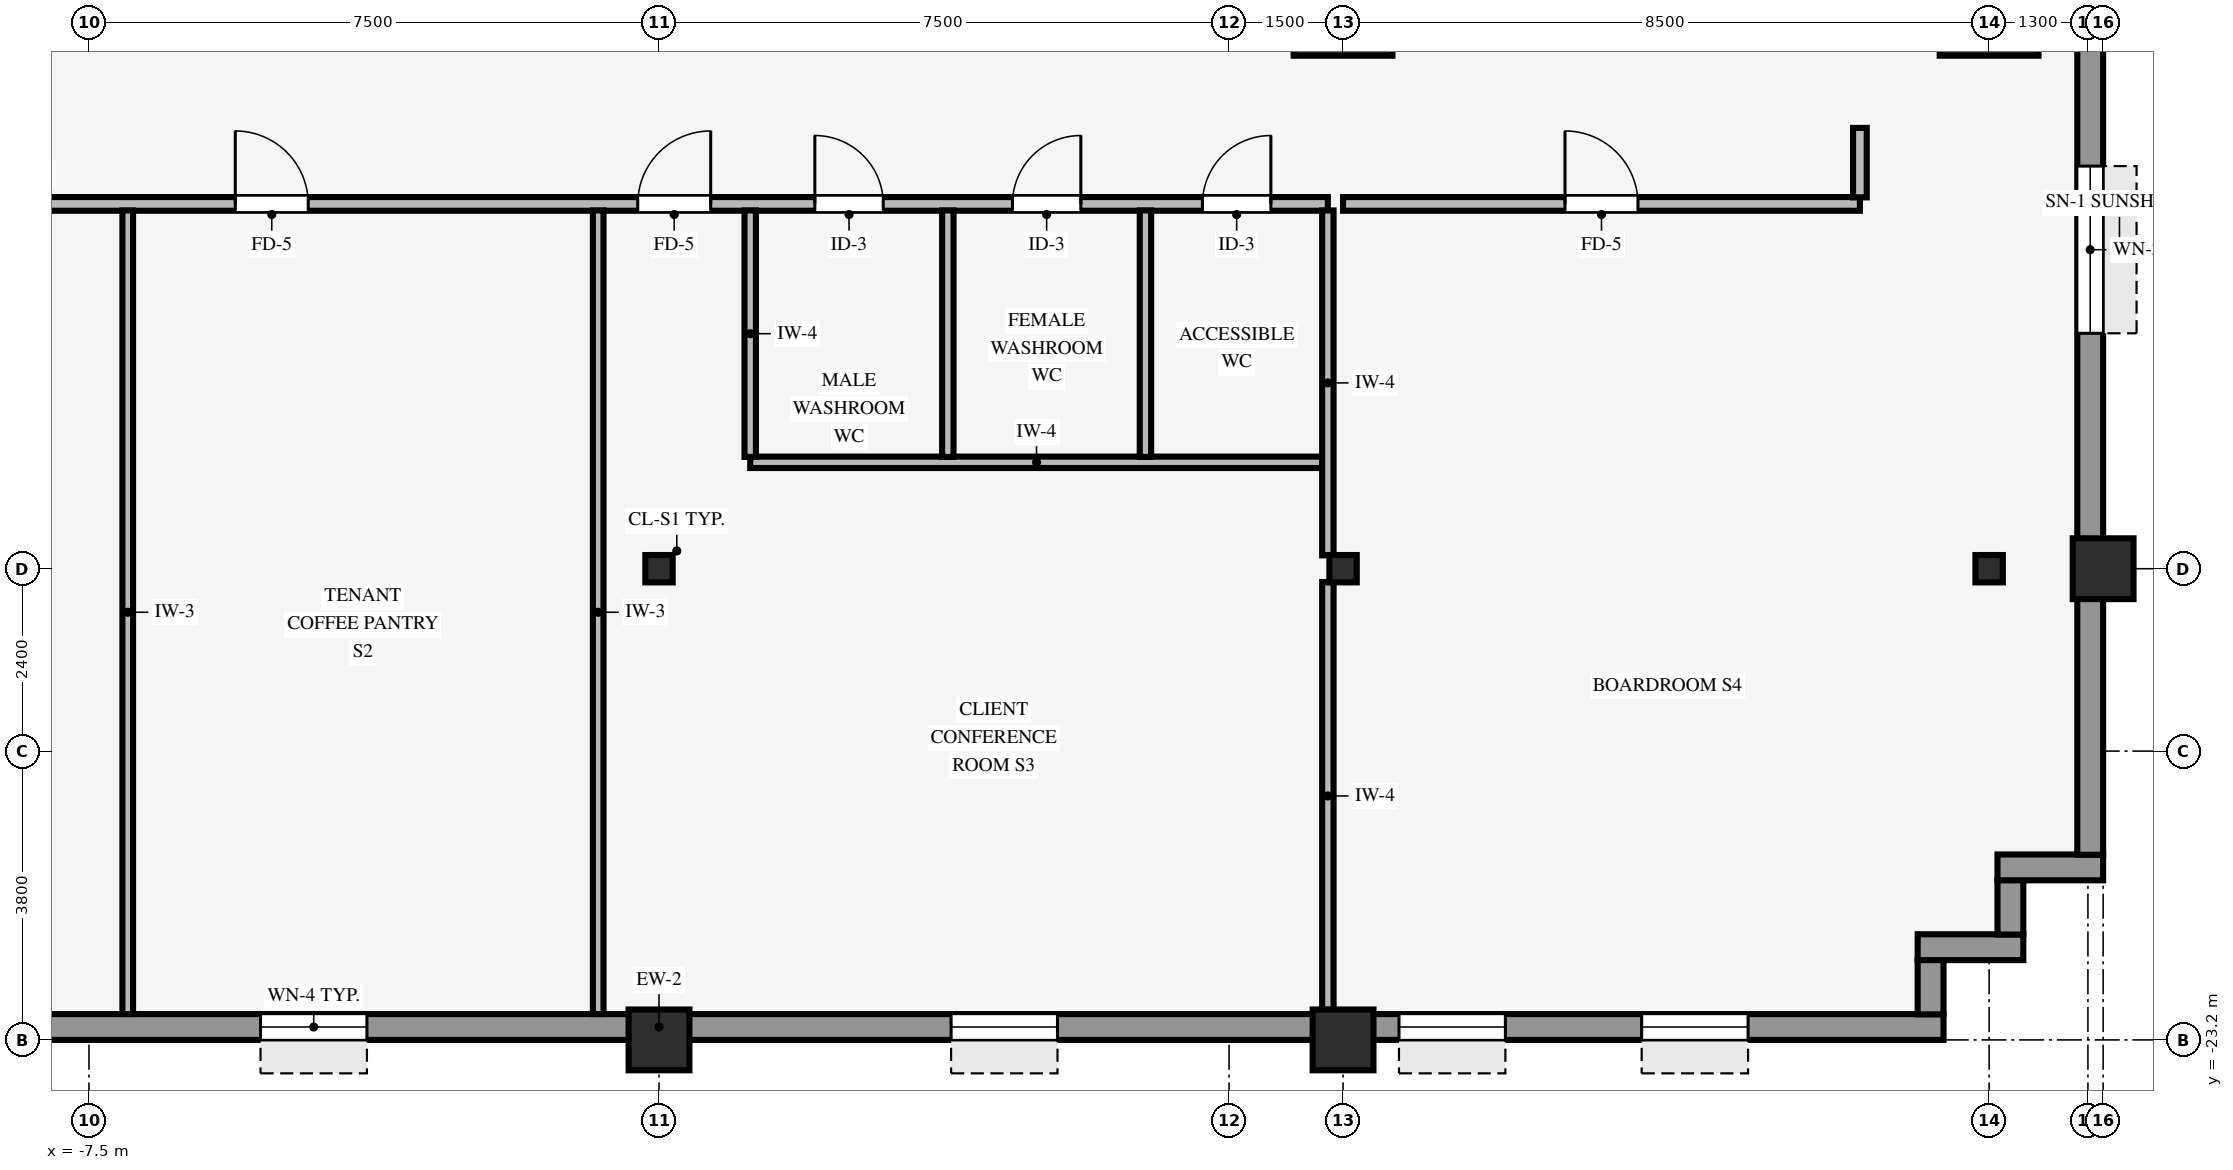
"""IFC4 building model, lengths in metres.
Left out: names, types, materials, properties, quantities, classifications, styles, units other than length and angle.
Written with IfcOpenShell. Run it as: python <this file> out.ifc"""

import sys

from ifc_helpers import new_model, si_unit, direction, frame, frame_2d, origin, origin_2d, place, context, subcontext, project, spatial, rectangle, hollow_rectangle, i_section, extrude, source, transform, mapped, element, fill, save


model = new_model("IFC4")
c1 = context("Model", 3, precision=1e-05, world=origin(), true_north=direction((0.0, 1.0)))
c2 = subcontext(c1, "Body", "Model", "MODEL_VIEW")
j1 = project(units=[si_unit("LENGTHUNIT", "METRE"), si_unit("PLANEANGLEUNIT", "RADIAN")], contexts=[c1])
p1 = place(None, origin())
s1 = spatial("IfcSite", under=j1, at=p1, CompositionType="ELEMENT")
p2 = place(p1, origin())
s2 = spatial("IfcBuilding", under=s1, at=p2, CompositionType="ELEMENT")
p3 = place(p2, frame((0.0, 0.0, 31.25)))
s3 = spatial("IfcBuildingStorey", under=s2, at=p3, CompositionType="ELEMENT", Elevation=31.25)
for number, where, z_axis, x_axis in (
    (1, (9.0, -9.6, 0.0), (0.0, 0.0, 1.0), (1.0, 0.0, 0.0)),
    (2, (17.5, -9.6, 0.0), (0.0, 0.0, 1.0), (1.0, 0.0, 0.0)),
):
    element("IfcColumn", number, at=place(p3, frame(where, z_axis=z_axis, x_axis=x_axis)), inside=s3, PredefinedType="COLUMN", context=c2, shape_type="SweptSolid", body=[
        extrude(rectangle(XDim=1.3, YDim=1.3, at=origin_2d()), origin(), (0.0, 0.0, 1.0), 3.37),
    ])
for number, where, z_axis, x_axis in (
    (3, (19.0, -17.0, 0.0), (0.0, 0.0, 1.0), (1.0, 0.0, 0.0)),
    (4, (0.0, -23.2, 0.0), (0.0, 0.0, 1.0), (1.0, 0.0, 0.0)),
    (5, (9.0, -23.2, 0.0), (0.0, 0.0, 1.0), (1.0, 0.0, 0.0)),
):
    element("IfcColumn", number, at=place(p3, frame(where, z_axis=z_axis, x_axis=x_axis)), inside=s3, PredefinedType="COLUMN", context=c2, shape_type="SweptSolid", body=[
        extrude(hollow_rectangle(XDim=0.8, YDim=0.8, WallThickness=0.055, InnerFilletRadius=0.055, OuterFilletRadius=0.11, at=origin_2d()), origin(), (0.0, 0.0, 1.0), 3.37),
    ])
for number, where, z_axis, x_axis in (
    (6, (0.0, -17.0, 0.0), (0.0, 0.0, 1.0), (1.0, 0.0, 0.0)),
    (7, (9.0, -17.0, 0.0), (0.0, 0.0, 1.0), (1.0, 0.0, 0.0)),
    (8, (17.5, -17.0, 0.0), (0.0, 0.0, 1.0), (1.0, 0.0, 0.0)),
):
    element("IfcColumn", number, at=place(p3, frame(where, z_axis=z_axis, x_axis=x_axis)), inside=s3, PredefinedType="COLUMN", context=c2, shape_type="SweptSolid", body=[
        extrude(i_section(OverallWidth=0.36, OverallDepth=0.36, WebThickness=0.021, FlangeThickness=0.021, FilletRadius=0.018, at=origin_2d()), origin(), (0.0, 0.0, 1.0), 3.37),
    ])
p4 = place(p3, frame((-16.9, -23.03, 0.0), z_axis=(0.0, 0.0, 1.0), x_axis=(1.0, 0.0, 0.0)))
e9 = element("IfcWall", 9, at=p4, inside=s3, PredefinedType="STANDARD", context=c2, shape_type="SweptSolid", body=[
    extrude(rectangle(XDim=33.8, YDim=0.34, at=frame_2d((16.9, 0.0))), origin(), (0.0, 0.0, 1.0), 2.705),
])
p5 = place(p4, frame((2.571, 0.0, 0.8)))
e10 = element("IfcOpeningElement", 10, at=p5, cuts=e9, PredefinedType="OPENING", context=c2, shape_type="SweptSolid", body=[
    extrude(rectangle(XDim=1.4, YDim=1.65, at=frame_2d((0.7, 0.825))), frame((0.0, 0.18, 0.0), z_axis=(0.0, -1.0, 0.0), x_axis=(1.0, 0.0, 0.0)), (0.0, 0.0, 1.0), 0.36),
])
p6 = place(p4, frame((5.764, 0.0, 0.8)))
e11 = element("IfcOpeningElement", 11, at=p6, cuts=e9, PredefinedType="OPENING", context=c2, shape_type="SweptSolid", body=[
    extrude(rectangle(XDim=1.4, YDim=1.65, at=frame_2d((0.7, 0.825))), frame((0.0, 0.18, 0.0), z_axis=(0.0, -1.0, 0.0), x_axis=(1.0, 0.0, 0.0)), (0.0, 0.0, 1.0), 0.36),
])
p7 = place(p4, frame((11.657, 0.0, 0.8)))
e12 = element("IfcOpeningElement", 12, at=p7, cuts=e9, PredefinedType="OPENING", context=c2, shape_type="SweptSolid", body=[
    extrude(rectangle(XDim=1.4, YDim=1.65, at=frame_2d((0.7, 0.825))), frame((0.0, 0.18, 0.0), z_axis=(0.0, -1.0, 0.0), x_axis=(1.0, 0.0, 0.0)), (0.0, 0.0, 1.0), 0.36),
])
p8 = place(p4, frame((20.743, 0.0, 0.8)))
e13 = element("IfcOpeningElement", 13, at=p8, cuts=e9, PredefinedType="OPENING", context=c2, shape_type="SweptSolid", body=[
    extrude(rectangle(XDim=1.4, YDim=1.65, at=frame_2d((0.7, 0.825))), frame((0.0, 0.18, 0.0), z_axis=(0.0, -1.0, 0.0), x_axis=(1.0, 0.0, 0.0)), (0.0, 0.0, 1.0), 0.36),
])
p9 = place(p4, frame((26.636, 0.0, 0.8)))
e14 = element("IfcOpeningElement", 14, at=p9, cuts=e9, PredefinedType="OPENING", context=c2, shape_type="SweptSolid", body=[
    extrude(rectangle(XDim=1.4, YDim=1.65, at=frame_2d((0.7, 0.825))), frame((0.0, 0.18, 0.0), z_axis=(0.0, -1.0, 0.0), x_axis=(1.0, 0.0, 0.0)), (0.0, 0.0, 1.0), 0.36),
])
p10 = place(p4, frame((29.829, 0.0, 0.8)))
e15 = element("IfcOpeningElement", 15, at=p10, cuts=e9, PredefinedType="OPENING", context=c2, shape_type="SweptSolid", body=[
    extrude(rectangle(XDim=1.4, YDim=1.65, at=frame_2d((0.7, 0.825))), frame((0.0, 0.18, 0.0), z_axis=(0.0, -1.0, 0.0), x_axis=(1.0, 0.0, 0.0)), (0.0, 0.0, 1.0), 0.36),
])
p11 = place(p3, frame((16.73, -22.864, 0.0), z_axis=(0.0, 0.0, 1.0), x_axis=(0.0, 1.0, 0.0)))
e16 = element("IfcWall", 16, at=p11, inside=s3, PredefinedType="STANDARD", context=c2, shape_type="SweptSolid", body=[
    extrude(rectangle(XDim=0.718, YDim=0.34, at=frame_2d((0.359, 0.0))), origin(), (0.0, 0.0, 1.0), 3.36),
])
p12 = place(p3, frame((16.56, -21.98, 0.0), z_axis=(0.0, 0.0, 1.0), x_axis=(1.0, 0.0, 0.0)))
e17 = element("IfcWall", 17, at=p12, inside=s3, PredefinedType="STANDARD", context=c2, shape_type="SweptSolid", body=[
    extrude(rectangle(XDim=1.39, YDim=0.34, at=frame_2d((0.695, 0.0))), origin(), (0.0, 0.0, 1.0), 3.36),
])
p13 = place(p3, frame((17.78, -21.814, 0.0), z_axis=(0.0, 0.0, 1.0), x_axis=(0.0, 1.0, 0.0)))
e18 = element("IfcWall", 18, at=p13, inside=s3, PredefinedType="STANDARD", context=c2, shape_type="SweptSolid", body=[
    extrude(rectangle(XDim=0.718, YDim=0.34, at=frame_2d((0.359, 0.0))), origin(), (0.0, 0.0, 1.0), 3.36),
])
p14 = place(p3, frame((17.61, -20.93, 0.0), z_axis=(0.0, 0.0, 1.0), x_axis=(1.0, 0.0, 0.0)))
e19 = element("IfcWall", 19, at=p14, inside=s3, PredefinedType="STANDARD", context=c2, shape_type="SweptSolid", body=[
    extrude(rectangle(XDim=1.39, YDim=0.34, at=frame_2d((0.695, 0.0))), origin(), (0.0, 0.0, 1.0), 3.36),
])
p15 = place(p3, frame((18.83, -20.764, 0.0), z_axis=(0.0, 0.0, 1.0), x_axis=(0.0, 1.0, 0.0)))
e20 = element("IfcWall", 20, at=p15, inside=s3, PredefinedType="STANDARD", context=c2, shape_type="SweptSolid", body=[
    extrude(rectangle(XDim=41.528, YDim=0.34, at=frame_2d((20.764, 0.0))), origin(), (0.0, 0.0, 1.0), 2.705),
])
p16 = place(p15, frame((6.862, 0.0, 0.8)))
e21 = element("IfcOpeningElement", 21, at=p16, cuts=e20, PredefinedType="OPENING", context=c2, shape_type="SweptSolid", body=[
    extrude(rectangle(XDim=2.2, YDim=1.65, at=frame_2d((1.1, 0.825))), frame((0.0, 0.18, 0.0), z_axis=(0.0, -1.0, 0.0), x_axis=(1.0, 0.0, 0.0)), (0.0, 0.0, 1.0), 0.36),
])
p17 = place(p15, frame((32.467, 0.0, 0.8)))
e22 = element("IfcOpeningElement", 22, at=p17, cuts=e20, PredefinedType="OPENING", context=c2, shape_type="SweptSolid", body=[
    extrude(rectangle(XDim=2.2, YDim=1.65, at=frame_2d((1.1, 0.825))), frame((0.0, 0.18, 0.0), z_axis=(0.0, -1.0, 0.0), x_axis=(1.0, 0.0, 0.0)), (0.0, 0.0, 1.0), 0.36),
])
p18 = place(p3, frame((1.2, -15.6, 0.0), z_axis=(0.0, 0.0, 1.0), x_axis=(1.0, 0.0, 0.0)))
e23 = element("IfcWall", 23, at=p18, inside=s3, PredefinedType="PARTITIONING", context=c2, shape_type="SweptSolid", body=[
    extrude(rectangle(XDim=7.534, YDim=0.15, at=frame_2d((3.767, 0.0))), origin(), (0.0, 0.0, 1.0), 3.36),
])
p19 = place(p3, frame((-15.8, -12.2, 0.0), z_axis=(0.0, 0.0, 1.0), x_axis=(1.0, 0.0, 0.0)))
e24 = element("IfcWall", 24, at=p19, inside=s3, PredefinedType="PARTITIONING", context=c2, shape_type="SweptSolid", body=[
    extrude(rectangle(XDim=24.6, YDim=0.18, at=frame_2d((12.3, 0.0))), origin(), (0.0, 0.0, 1.0), 3.36),
])
p20 = place(p19, frame((3.925, 0.0, 0.0)))
e25 = element("IfcOpeningElement", 25, at=p20, cuts=e24, PredefinedType="OPENING", context=c2, shape_type="SweptSolid", body=[
    extrude(rectangle(XDim=0.96, YDim=2.1, at=frame_2d((0.48, 1.05))), frame((0.0, 0.1, 0.0), z_axis=(0.0, -1.0, 0.0), x_axis=(1.0, 0.0, 0.0)), (0.0, 0.0, 1.0), 0.2),
])
p21 = place(p19, frame((10.225, 0.0, 0.0)))
e26 = element("IfcOpeningElement", 26, at=p21, cuts=e24, PredefinedType="OPENING", context=c2, shape_type="SweptSolid", body=[
    extrude(rectangle(XDim=0.96, YDim=2.1, at=frame_2d((0.48, 1.05))), frame((0.0, 0.1, 0.0), z_axis=(0.0, -1.0, 0.0), x_axis=(1.0, 0.0, 0.0)), (0.0, 0.0, 1.0), 0.2),
])
p22 = place(p19, frame((20.45, 0.0, 0.0)))
e27 = element("IfcOpeningElement", 27, at=p22, cuts=e24, PredefinedType="OPENING", context=c2, shape_type="SweptSolid", body=[
    extrude(rectangle(XDim=0.9, YDim=2.1, at=frame_2d((0.45, 1.05))), frame((0.0, 0.1, 0.0), z_axis=(0.0, -1.0, 0.0), x_axis=(1.0, 0.0, 0.0)), (0.0, 0.0, 1.0), 0.2),
])
p23 = place(p19, frame((17.85, 0.0, 0.0)))
e28 = element("IfcOpeningElement", 28, at=p23, cuts=e24, PredefinedType="OPENING", context=c2, shape_type="SweptSolid", body=[
    extrude(rectangle(XDim=0.9, YDim=2.1, at=frame_2d((0.45, 1.05))), frame((0.0, 0.1, 0.0), z_axis=(0.0, -1.0, 0.0), x_axis=(1.0, 0.0, 0.0)), (0.0, 0.0, 1.0), 0.2),
])
p24 = place(p19, frame((22.95, 0.0, 0.0)))
e29 = element("IfcOpeningElement", 29, at=p24, cuts=e24, PredefinedType="OPENING", context=c2, shape_type="SweptSolid", body=[
    extrude(rectangle(XDim=0.9, YDim=2.1, at=frame_2d((0.45, 1.05))), frame((0.0, 0.1, 0.0), z_axis=(0.0, -1.0, 0.0), x_axis=(1.0, 0.0, 0.0)), (0.0, 0.0, 1.0), 0.2),
])
p25 = place(p19, frame((15.52, 0.0, 0.0)))
e30 = element("IfcOpeningElement", 30, at=p25, cuts=e24, PredefinedType="OPENING", context=c2, shape_type="SweptSolid", body=[
    extrude(rectangle(XDim=0.96, YDim=2.1, at=frame_2d((0.48, 1.05))), frame((0.0, 0.1, 0.0), z_axis=(0.0, -1.0, 0.0), x_axis=(1.0, 0.0, 0.0)), (0.0, 0.0, 1.0), 0.2),
])
p26 = place(p3, frame((9.0, -12.2, 0.0), z_axis=(0.0, 0.0, 1.0), x_axis=(1.0, 0.0, 0.0)))
e31 = element("IfcWall", 31, at=p26, inside=s3, PredefinedType="PARTITIONING", context=c2, shape_type="SweptSolid", body=[
    extrude(rectangle(XDim=6.8, YDim=0.18, at=frame_2d((3.4, 0.0))), origin(), (0.0, 0.0, 1.0), 3.36),
])
p27 = place(p26, frame((2.92, 0.0, 0.0)))
e32 = element("IfcOpeningElement", 32, at=p27, cuts=e31, PredefinedType="OPENING", context=c2, shape_type="SweptSolid", body=[
    extrude(rectangle(XDim=0.96, YDim=2.1, at=frame_2d((0.48, 1.05))), frame((0.0, 0.1, 0.0), z_axis=(0.0, -1.0, 0.0), x_axis=(1.0, 0.0, 0.0)), (0.0, 0.0, 1.0), 0.2),
])
for number, where, z_axis, x_axis in (
    (33, (-6.99, -22.86, 0.0), (0.0, 0.0, 1.0), (0.0, 1.0, 0.0)),
    (34, (-0.8, -22.86, 0.0), (0.0, 0.0, 1.0), (0.0, 1.0, 0.0)),
):
    element("IfcWall", number, at=place(p3, frame(where, z_axis=z_axis, x_axis=x_axis)), inside=s3, PredefinedType="PARTITIONING", context=c2, shape_type="SweptSolid", body=[
        extrude(rectangle(XDim=10.574, YDim=0.14, at=frame_2d((5.287, 0.0))), origin(), (0.0, 0.0, 1.0), 3.36),
    ])
for number, where, z_axis, x_axis in (
    (35, (1.2, -15.529, 0.0), (0.0, 0.0, 1.0), (0.0, 1.0, 0.0)),
    (36, (3.8, -15.529, 0.0), (0.0, 0.0, 1.0), (0.0, 1.0, 0.0)),
    (37, (6.4, -15.529, 0.0), (0.0, 0.0, 1.0), (0.0, 1.0, 0.0)),
):
    element("IfcWall", number, at=place(p3, frame(where, z_axis=z_axis, x_axis=x_axis)), inside=s3, PredefinedType="PARTITIONING", context=c2, shape_type="SweptSolid", body=[
        extrude(rectangle(XDim=3.243, YDim=0.15, at=frame_2d((1.622, 0.0))), origin(), (0.0, 0.0, 1.0), 3.36),
    ])
p28 = place(p3, frame((8.8, -22.804, 0.0), z_axis=(0.0, 0.0, 1.0), x_axis=(0.0, 1.0, 0.0)))
e38 = element("IfcWall", 38, at=p28, inside=s3, PredefinedType="PARTITIONING", context=c2, shape_type="SweptSolid", body=[
    extrude(rectangle(XDim=5.628, YDim=0.15, at=frame_2d((2.814, 0.0))), origin(), (0.0, 0.0, 1.0), 2.738),
])
p29 = place(p3, frame((8.8, -16.824, 0.0), z_axis=(0.0, 0.0, 1.0), x_axis=(0.0, 1.0, 0.0)))
e39 = element("IfcWall", 39, at=p29, inside=s3, PredefinedType="PARTITIONING", context=c2, shape_type="SweptSolid", body=[
    extrude(rectangle(XDim=4.538, YDim=0.15, at=frame_2d((2.269, 0.0))), origin(), (0.0, 0.0, 1.0), 2.738),
])
p30 = place(p3, frame((15.8, -12.114, 0.0), z_axis=(0.0, 0.0, 1.0), x_axis=(0.0, 1.0, 0.0)))
e40 = element("IfcWall", 40, at=p30, inside=s3, PredefinedType="PARTITIONING", context=c2, shape_type="SweptSolid", body=[
    extrude(rectangle(XDim=0.914, YDim=0.18, at=frame_2d((0.457, 0.0))), origin(), (0.0, 0.0, 1.0), 3.36),
])
m1 = source(origin(), c2, "Body", "SweptSolid", [
    extrude(rectangle(XDim=1.4, YDim=1.65, at=frame_2d((0.7, 0.825))), frame((0.0, 0.03, 0.0), z_axis=(0.0, -1.0, 0.0), x_axis=(1.0, 0.0, 0.0)), (0.0, 0.0, 1.0), 0.06),
])
p31 = place(p7, origin())
e41 = element("IfcWindow", 41, at=p31, inside=s3, PartitioningType="SINGLE_PANEL", PredefinedType="WINDOW", context=c2, shape_type="MappedRepresentation", body=[
    mapped(m1, transform((0.0, 0.0, 0.0), scale=1.0)),
])
fill(e12, e41)
p32 = place(p8, origin())
e42 = element("IfcWindow", 42, at=p32, inside=s3, PartitioningType="SINGLE_PANEL", PredefinedType="WINDOW", context=c2, shape_type="MappedRepresentation", body=[
    mapped(m1, transform((0.0, 0.0, 0.0), scale=1.0)),
])
fill(e13, e42)
p33 = place(p9, origin())
e43 = element("IfcWindow", 43, at=p33, inside=s3, PartitioningType="SINGLE_PANEL", PredefinedType="WINDOW", context=c2, shape_type="MappedRepresentation", body=[
    mapped(m1, transform((0.0, 0.0, 0.0), scale=1.0)),
])
fill(e14, e43)
p34 = place(p10, origin())
e44 = element("IfcWindow", 44, at=p34, inside=s3, PartitioningType="SINGLE_PANEL", PredefinedType="WINDOW", context=c2, shape_type="MappedRepresentation", body=[
    mapped(m1, transform((0.0, 0.0, 0.0), scale=1.0)),
])
fill(e15, e44)
m2 = source(origin(), c2, "Body", "SweptSolid", [
    extrude(rectangle(XDim=2.2, YDim=1.65, at=frame_2d((1.1, 0.825))), frame((0.0, 0.03, 0.0), z_axis=(0.0, -1.0, 0.0), x_axis=(1.0, 0.0, 0.0)), (0.0, 0.0, 1.0), 0.06),
])
p35 = place(p16, origin())
e45 = element("IfcWindow", 45, at=p35, inside=s3, PartitioningType="SINGLE_PANEL", PredefinedType="WINDOW", context=c2, shape_type="MappedRepresentation", body=[
    mapped(m2, transform((0.0, 0.0, 0.0), scale=1.0)),
])
fill(e21, e45)
m3 = source(origin(), c2, "Body", "SweptSolid", [
    extrude(rectangle(XDim=0.96, YDim=2.1, at=frame_2d((0.48, 1.05))), frame((0.0, 0.025, 0.0), z_axis=(0.0, -1.0, 0.0), x_axis=(1.0, 0.0, 0.0)), (0.0, 0.0, 1.0), 0.05),
])
p36 = place(p27, origin())
e46 = element("IfcDoor", 46, at=p36, inside=s3, OperationType="SINGLE_SWING_LEFT", PredefinedType="DOOR", context=c2, shape_type="MappedRepresentation", body=[
    mapped(m3, transform((0.0, 0.0, 0.0), scale=1.0)),
])
fill(e32, e46)
p37 = place(p21, origin())
e47 = element("IfcDoor", 47, at=p37, inside=s3, OperationType="SINGLE_SWING_LEFT", PredefinedType="DOOR", context=c2, shape_type="MappedRepresentation", body=[
    mapped(m3, transform((0.0, 0.0, 0.0), scale=1.0)),
])
fill(e26, e47)
m4 = source(origin(), c2, "Body", "SweptSolid", [
    extrude(rectangle(XDim=0.9, YDim=2.1, at=frame_2d((0.45, 1.05))), frame((0.0, 0.025, 0.0), z_axis=(0.0, -1.0, 0.0), x_axis=(1.0, 0.0, 0.0)), (0.0, 0.0, 1.0), 0.05),
])
p38 = place(p22, origin())
e48 = element("IfcDoor", 48, at=p38, inside=s3, OperationType="SINGLE_SWING_RIGHT", PredefinedType="DOOR", context=c2, shape_type="MappedRepresentation", body=[
    mapped(m4, transform((0.0, 0.0, 0.0), scale=1.0)),
])
fill(e27, e48)
p39 = place(p23, origin())
e49 = element("IfcDoor", 49, at=p39, inside=s3, OperationType="SINGLE_SWING_LEFT", PredefinedType="DOOR", context=c2, shape_type="MappedRepresentation", body=[
    mapped(m4, transform((0.0, 0.0, 0.0), scale=1.0)),
])
fill(e28, e49)
p40 = place(p24, origin())
e50 = element("IfcDoor", 50, at=p40, inside=s3, OperationType="SINGLE_SWING_RIGHT", PredefinedType="DOOR", context=c2, shape_type="MappedRepresentation", body=[
    mapped(m4, transform((0.0, 0.0, 0.0), scale=1.0)),
])
fill(e29, e50)
p41 = place(p25, origin())
e51 = element("IfcDoor", 51, at=p41, inside=s3, OperationType="SINGLE_SWING_RIGHT", PredefinedType="DOOR", context=c2, shape_type="MappedRepresentation", body=[
    mapped(m3, transform((0.0, 0.0, 0.0), scale=1.0)),
])
fill(e30, e51)
save(model, sys.argv[1])
